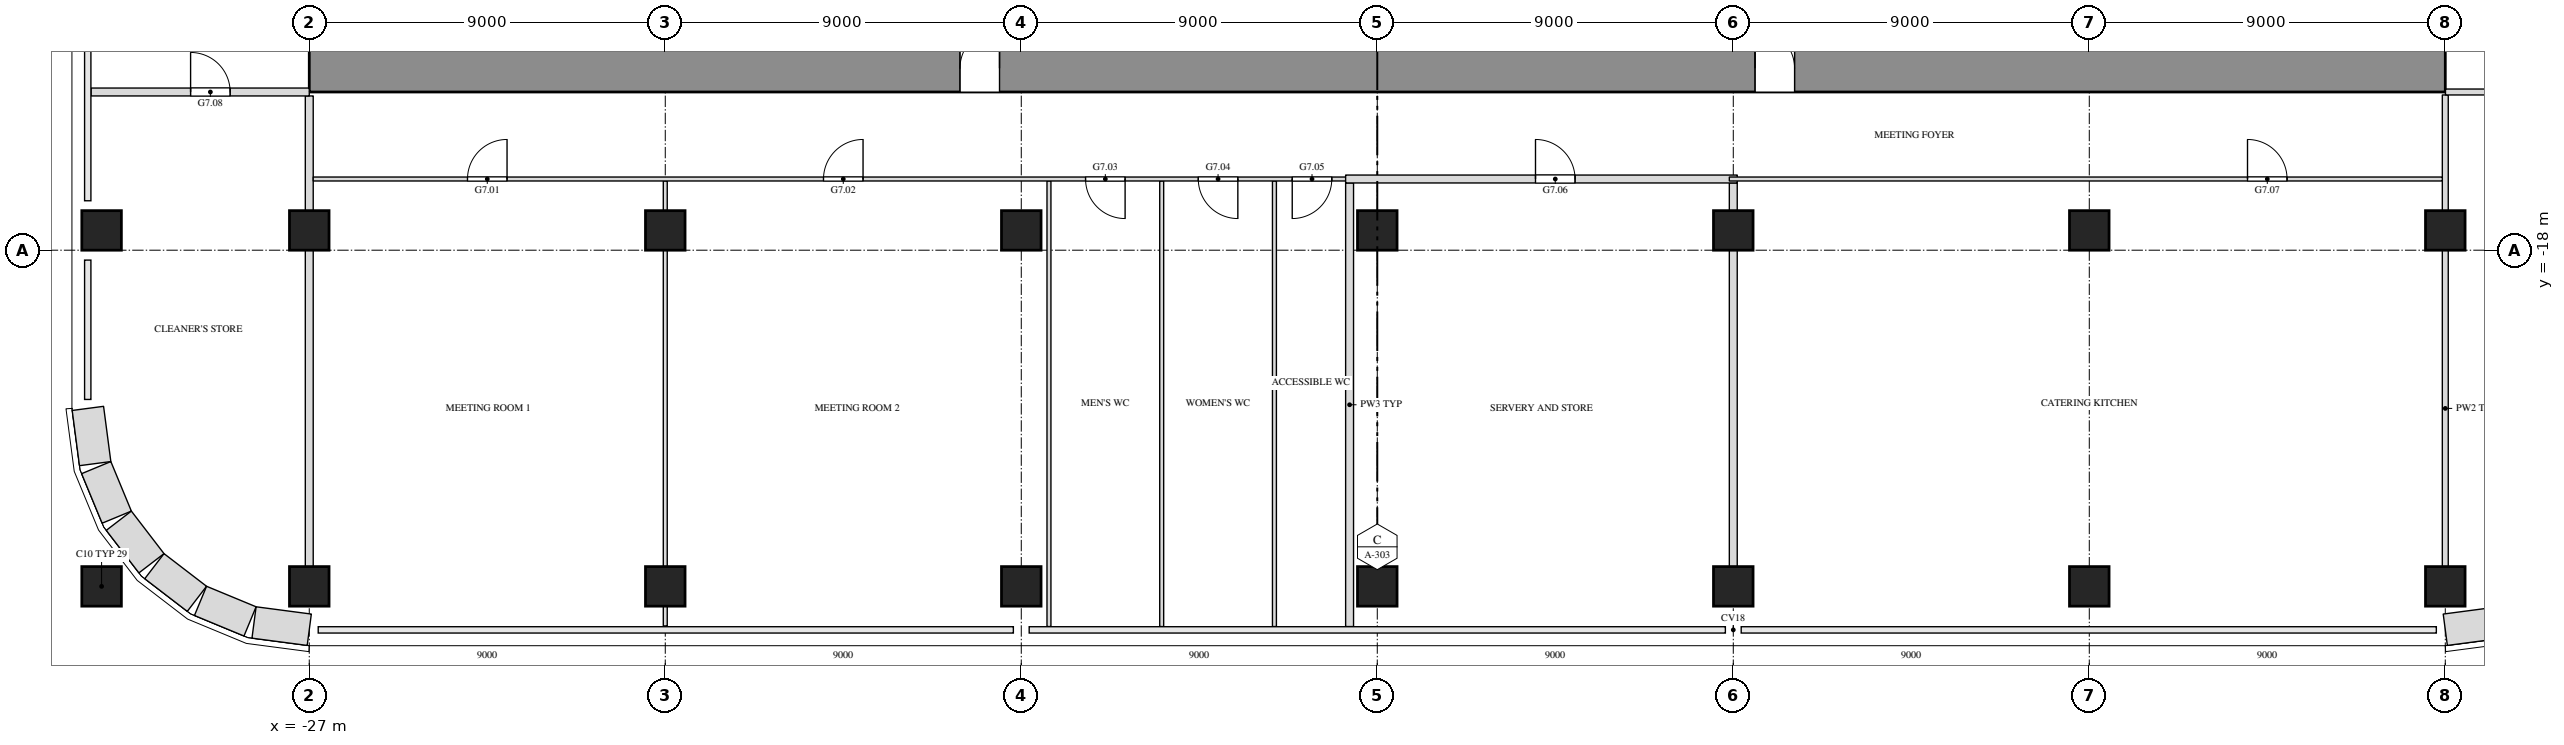
"""IFC4 building model, lengths in metres.
Left out: names, types, materials, properties, quantities, classifications, styles, units other than length and angle.
Written with IfcOpenShell. Run it as: python <this file> out.ifc"""

import sys

from ifc_helpers import new_model, si_unit, direction, frame, frame_2d, origin, origin_2d, place, context, subcontext, project, spatial, rectangle, extrude, element, fill, save


model = new_model("IFC4")
c1 = context("Model", 3, precision=1e-05, world=origin(), true_north=direction((0.0, 1.0)))
c2 = subcontext(c1, "Body", "Model", "MODEL_VIEW")
j1 = project(units=[si_unit("LENGTHUNIT", "METRE"), si_unit("PLANEANGLEUNIT", "RADIAN")], contexts=[c1])
p1 = place(None, origin())
s1 = spatial("IfcSite", under=j1, at=p1, CompositionType="ELEMENT")
p2 = place(p1, origin())
s2 = spatial("IfcBuilding", under=s1, at=p2, CompositionType="ELEMENT")
p3 = place(p2, frame((0.0, 0.0, 43.5)))
s3 = spatial("IfcBuildingStorey", under=s2, at=p3, CompositionType="ELEMENT", Elevation=43.5)
for number, where, z_axis, x_axis in (
    (1, (-32.25, -26.5, 0.0), (0.0, 0.0, 1.0), (1.0, 0.0, 0.0)),
    (2, (-27.0, -26.5, 0.0), (0.0, 0.0, 1.0), (1.0, 0.0, 0.0)),
    (3, (-18.0, -26.5, 0.0), (0.0, 0.0, 1.0), (1.0, 0.0, 0.0)),
    (4, (-9.0, -26.5, 0.0), (0.0, 0.0, 1.0), (1.0, 0.0, 0.0)),
    (5, (0.0, -26.5, 0.0), (0.0, 0.0, 1.0), (1.0, 0.0, 0.0)),
    (6, (9.0, -26.5, 0.0), (0.0, 0.0, 1.0), (1.0, 0.0, 0.0)),
    (7, (18.0, -26.5, 0.0), (0.0, 0.0, 1.0), (1.0, 0.0, 0.0)),
    (8, (27.0, -26.5, 0.0), (0.0, 0.0, 1.0), (1.0, 0.0, 0.0)),
    (9, (-32.25, -17.5, 0.0), (0.0, 0.0, 1.0), (1.0, 0.0, 0.0)),
    (10, (-27.0, -17.5, 0.0), (0.0, 0.0, 1.0), (1.0, 0.0, 0.0)),
    (11, (-18.0, -17.5, 0.0), (0.0, 0.0, 1.0), (1.0, 0.0, 0.0)),
    (12, (-9.0, -17.5, 0.0), (0.0, 0.0, 1.0), (1.0, 0.0, 0.0)),
    (13, (0.0, -17.5, 0.0), (0.0, 0.0, 1.0), (1.0, 0.0, 0.0)),
    (14, (9.0, -17.5, 0.0), (0.0, 0.0, 1.0), (1.0, 0.0, 0.0)),
    (15, (18.0, -17.5, 0.0), (0.0, 0.0, 1.0), (1.0, 0.0, 0.0)),
    (16, (27.0, -17.5, 0.0), (0.0, 0.0, 1.0), (1.0, 0.0, 0.0)),
):
    element("IfcColumn", number, at=place(p3, frame(where, z_axis=z_axis, x_axis=x_axis)), inside=s3, PredefinedType="COLUMN", context=c2, shape_type="SweptSolid", body=[
        extrude(rectangle(XDim=1.0, YDim=1.0, at=origin_2d()), origin(), (0.0, 0.0, 1.0), 4.5),
    ])
p4 = place(p3, frame((-27.0, -13.4, 0.0), z_axis=(0.0, 0.0, 1.0), x_axis=(1.0, 0.0, 0.0)))
e17 = element("IfcWall", 17, at=p4, inside=s3, PredefinedType="SHEAR", context=c2, shape_type="SweptSolid", body=[
    extrude(rectangle(XDim=54.0, YDim=1.2, at=frame_2d((27.0, 0.0))), origin(), (0.0, 0.0, 1.0), 4.25),
])
p5 = place(p4, frame((16.45, 0.0, 0.0)))
e18 = element("IfcOpeningElement", 18, at=p5, cuts=e17, PredefinedType="OPENING", context=c2, shape_type="SweptSolid", body=[
    extrude(rectangle(XDim=1.0, YDim=2.1, at=frame_2d((0.5, 1.05))), frame((0.0, 0.612, 0.0), z_axis=(0.0, -1.0, 0.0), x_axis=(1.0, 0.0, 0.0)), (0.0, 0.0, 1.0), 1.224),
])
p6 = place(p4, frame((36.55, 0.0, 0.0)))
e19 = element("IfcOpeningElement", 19, at=p6, cuts=e17, PredefinedType="OPENING", context=c2, shape_type="SweptSolid", body=[
    extrude(rectangle(XDim=1.0, YDim=2.1, at=frame_2d((0.5, 1.05))), frame((0.0, 0.612, 0.0), z_axis=(0.0, -1.0, 0.0), x_axis=(1.0, 0.0, 0.0)), (0.0, 0.0, 1.0), 1.224),
])
p7 = place(p3, frame((-18.0, -27.5, 0.0), z_axis=(0.0, 0.0, 1.0), x_axis=(0.0, 1.0, 0.0)))
e20 = element("IfcWall", 20, at=p7, inside=s3, PredefinedType="PARTITIONING", context=c2, shape_type="SweptSolid", body=[
    extrude(rectangle(XDim=0.5, YDim=0.1, at=frame_2d((0.25, 0.0))), origin(), (0.0, 0.0, 1.0), 4.25),
])
p8 = place(p3, frame((-18.0, -26.0, 0.0), z_axis=(0.0, 0.0, 1.0), x_axis=(0.0, 1.0, 0.0)))
e21 = element("IfcWall", 21, at=p8, inside=s3, PredefinedType="PARTITIONING", context=c2, shape_type="SweptSolid", body=[
    extrude(rectangle(XDim=8.0, YDim=0.1, at=frame_2d((4.0, 0.0))), origin(), (0.0, 0.0, 1.0), 3.638),
])
p9 = place(p3, frame((-18.0, -17.0, 0.0), z_axis=(0.0, 0.0, 1.0), x_axis=(0.0, 1.0, 0.0)))
e22 = element("IfcWall", 22, at=p9, inside=s3, PredefinedType="PARTITIONING", context=c2, shape_type="SweptSolid", body=[
    extrude(rectangle(XDim=0.75, YDim=0.1, at=frame_2d((0.375, 0.0))), origin(), (0.0, 0.0, 1.0), 4.25),
])
for number, where, z_axis, x_axis in (
    (23, (-8.3, -27.516, 0.0), (0.0, 0.0, 1.0), (0.0, 1.0, 0.0)),
    (24, (-5.45, -27.516, 0.0), (0.0, 0.0, 1.0), (0.0, 1.0, 0.0)),
    (25, (-2.6, -27.516, 0.0), (0.0, 0.0, 1.0), (0.0, 1.0, 0.0)),
):
    element("IfcWall", number, at=place(p3, frame(where, z_axis=z_axis, x_axis=x_axis)), inside=s3, PredefinedType="PARTITIONING", context=c2, shape_type="SweptSolid", body=[
        extrude(rectangle(XDim=11.266, YDim=0.1, at=frame_2d((5.633, 0.0))), origin(), (0.0, 0.0, 1.0), 4.25),
    ])
p10 = place(p3, frame((-0.7, -27.516, 0.0), z_axis=(0.0, 0.0, 1.0), x_axis=(0.0, 1.0, 0.0)))
e26 = element("IfcWall", 26, at=p10, inside=s3, PredefinedType="PARTITIONING", context=c2, shape_type="SweptSolid", body=[
    extrude(rectangle(XDim=11.216, YDim=0.2, at=frame_2d((5.608, 0.0))), origin(), (0.0, 0.0, 1.0), 4.25),
])
p11 = place(p3, frame((9.0, -26.0, 0.0), z_axis=(0.0, 0.0, 1.0), x_axis=(0.0, 1.0, 0.0)))
e27 = element("IfcWall", 27, at=p11, inside=s3, PredefinedType="PARTITIONING", context=c2, shape_type="SweptSolid", body=[
    extrude(rectangle(XDim=8.0, YDim=0.2, at=frame_2d((4.0, 0.0))), origin(), (0.0, 0.0, 1.0), 3.638),
])
p12 = place(p3, frame((9.0, -17.0, 0.0), z_axis=(0.0, 0.0, 1.0), x_axis=(0.0, 1.0, 0.0)))
e28 = element("IfcWall", 28, at=p12, inside=s3, PredefinedType="PARTITIONING", context=c2, shape_type="SweptSolid", body=[
    extrude(rectangle(XDim=0.7, YDim=0.2, at=frame_2d((0.35, 0.0))), origin(), (0.0, 0.0, 1.0), 4.25),
])
p13 = place(p3, frame((-27.0, -26.0, 0.0), z_axis=(0.0, 0.0, 1.0), x_axis=(0.0, 1.0, 0.0)))
e29 = element("IfcWall", 29, at=p13, inside=s3, PredefinedType="PARTITIONING", context=c2, shape_type="SweptSolid", body=[
    extrude(rectangle(XDim=8.0, YDim=0.2, at=frame_2d((4.0, 0.0))), origin(), (0.0, 0.0, 1.0), 3.638),
])
p14 = place(p3, frame((-27.0, -17.0, 0.0), z_axis=(0.0, 0.0, 1.0), x_axis=(0.0, 1.0, 0.0)))
e30 = element("IfcWall", 30, at=p14, inside=s3, PredefinedType="PARTITIONING", context=c2, shape_type="SweptSolid", body=[
    extrude(rectangle(XDim=2.9, YDim=0.2, at=frame_2d((1.45, 0.0))), origin(), (0.0, 0.0, 1.0), 3.638),
])
p15 = place(p3, frame((27.0, -26.0, 0.0), z_axis=(0.0, 0.0, 1.0), x_axis=(0.0, 1.0, 0.0)))
e31 = element("IfcWall", 31, at=p15, inside=s3, PredefinedType="PARTITIONING", context=c2, shape_type="SweptSolid", body=[
    extrude(rectangle(XDim=8.0, YDim=0.15, at=frame_2d((4.0, 0.0))), origin(), (0.0, 0.0, 1.0), 3.638),
])
p16 = place(p3, frame((27.0, -17.0, 0.0), z_axis=(0.0, 0.0, 1.0), x_axis=(0.0, 1.0, 0.0)))
e32 = element("IfcWall", 32, at=p16, inside=s3, PredefinedType="PARTITIONING", context=c2, shape_type="SweptSolid", body=[
    extrude(rectangle(XDim=2.925, YDim=0.15, at=frame_2d((1.462, 0.0))), origin(), (0.0, 0.0, 1.0), 3.638),
])
p17 = place(p3, frame((-26.9, -16.2, 0.0), z_axis=(0.0, 0.0, 1.0), x_axis=(1.0, 0.0, 0.0)))
e33 = element("IfcWall", 33, at=p17, inside=s3, PredefinedType="PARTITIONING", context=c2, shape_type="SweptSolid", body=[
    extrude(rectangle(XDim=26.3, YDim=0.1, at=frame_2d((13.15, 0.0))), origin(), (0.0, 0.0, 1.0), 4.25),
])
p18 = place(p17, frame((3.9, 0.0, 0.0)))
e34 = element("IfcOpeningElement", 34, at=p18, cuts=e33, PredefinedType="OPENING", context=c2, shape_type="SweptSolid", body=[
    extrude(rectangle(XDim=1.0, YDim=2.1, at=frame_2d((0.5, 1.05))), frame((0.0, 0.062, 0.0), z_axis=(0.0, -1.0, 0.0), x_axis=(1.0, 0.0, 0.0)), (0.0, 0.0, 1.0), 0.124),
])
p19 = place(p17, frame((12.9, 0.0, 0.0)))
e35 = element("IfcOpeningElement", 35, at=p19, cuts=e33, PredefinedType="OPENING", context=c2, shape_type="SweptSolid", body=[
    extrude(rectangle(XDim=1.0, YDim=2.1, at=frame_2d((0.5, 1.05))), frame((0.0, 0.062, 0.0), z_axis=(0.0, -1.0, 0.0), x_axis=(1.0, 0.0, 0.0)), (0.0, 0.0, 1.0), 0.124),
])
p20 = place(p17, frame((19.525, 0.0, 0.0)))
e36 = element("IfcOpeningElement", 36, at=p20, cuts=e33, PredefinedType="OPENING", context=c2, shape_type="SweptSolid", body=[
    extrude(rectangle(XDim=1.0, YDim=2.1, at=frame_2d((0.5, 1.05))), frame((0.0, 0.062, 0.0), z_axis=(0.0, -1.0, 0.0), x_axis=(1.0, 0.0, 0.0)), (0.0, 0.0, 1.0), 0.124),
])
p21 = place(p17, frame((22.375, 0.0, 0.0)))
e37 = element("IfcOpeningElement", 37, at=p21, cuts=e33, PredefinedType="OPENING", context=c2, shape_type="SweptSolid", body=[
    extrude(rectangle(XDim=1.0, YDim=2.1, at=frame_2d((0.5, 1.05))), frame((0.0, 0.062, 0.0), z_axis=(0.0, -1.0, 0.0), x_axis=(1.0, 0.0, 0.0)), (0.0, 0.0, 1.0), 0.124),
])
p22 = place(p17, frame((24.75, 0.0, 0.0)))
e38 = element("IfcOpeningElement", 38, at=p22, cuts=e33, PredefinedType="OPENING", context=c2, shape_type="SweptSolid", body=[
    extrude(rectangle(XDim=1.0, YDim=2.1, at=frame_2d((0.5, 1.05))), frame((0.0, 0.062, 0.0), z_axis=(0.0, -1.0, 0.0), x_axis=(1.0, 0.0, 0.0)), (0.0, 0.0, 1.0), 0.124),
])
p23 = place(p3, frame((-0.8, -16.2, 0.0), z_axis=(0.0, 0.0, 1.0), x_axis=(1.0, 0.0, 0.0)))
e39 = element("IfcWall", 39, at=p23, inside=s3, PredefinedType="PARTITIONING", context=c2, shape_type="SweptSolid", body=[
    extrude(rectangle(XDim=9.9, YDim=0.2, at=frame_2d((4.95, 0.0))), origin(), (0.0, 0.0, 1.0), 4.25),
])
p24 = place(p23, frame((4.8, 0.0, 0.0)))
e40 = element("IfcOpeningElement", 40, at=p24, cuts=e39, PredefinedType="OPENING", context=c2, shape_type="SweptSolid", body=[
    extrude(rectangle(XDim=1.0, YDim=2.1, at=frame_2d((0.5, 1.05))), frame((0.0, 0.112, 0.0), z_axis=(0.0, -1.0, 0.0), x_axis=(1.0, 0.0, 0.0)), (0.0, 0.0, 1.0), 0.224),
])
p25 = place(p3, frame((8.9, -16.2, 0.0), z_axis=(0.0, 0.0, 1.0), x_axis=(1.0, 0.0, 0.0)))
e41 = element("IfcWall", 41, at=p25, inside=s3, PredefinedType="PARTITIONING", context=c2, shape_type="SweptSolid", body=[
    extrude(rectangle(XDim=18.025, YDim=0.1, at=frame_2d((9.013, 0.0))), origin(), (0.0, 0.0, 1.0), 4.25),
])
p26 = place(p25, frame((13.1, 0.0, 0.0)))
e42 = element("IfcOpeningElement", 42, at=p26, cuts=e41, PredefinedType="OPENING", context=c2, shape_type="SweptSolid", body=[
    extrude(rectangle(XDim=1.0, YDim=2.1, at=frame_2d((0.5, 1.05))), frame((0.0, 0.062, 0.0), z_axis=(0.0, -1.0, 0.0), x_axis=(1.0, 0.0, 0.0)), (0.0, 0.0, 1.0), 0.124),
])
p27 = place(p3, frame((-32.516, -14.0, 0.0), z_axis=(0.0, 0.0, 1.0), x_axis=(1.0, 0.0, 0.0)))
e43 = element("IfcWall", 43, at=p27, inside=s3, PredefinedType="PARTITIONING", context=c2, shape_type="SweptSolid", body=[
    extrude(rectangle(XDim=5.516, YDim=0.2, at=frame_2d((2.758, 0.0))), origin(), (0.0, 0.0, 1.0), 4.25),
])
p28 = place(p27, frame((2.516, 0.0, 0.0)))
e44 = element("IfcOpeningElement", 44, at=p28, cuts=e43, PredefinedType="OPENING", context=c2, shape_type="SweptSolid", body=[
    extrude(rectangle(XDim=1.0, YDim=2.1, at=frame_2d((0.5, 1.05))), frame((0.0, 0.112, 0.0), z_axis=(0.0, -1.0, 0.0), x_axis=(1.0, 0.0, 0.0)), (0.0, 0.0, 1.0), 0.224),
])
p29 = place(p3, frame((27.005, -14.0, 0.0), z_axis=(0.0, 0.0, 1.0), x_axis=(1.0, 0.0, 0.0)))
e45 = element("IfcWall", 45, at=p29, inside=s3, PredefinedType="PARTITIONING", context=c2, shape_type="SweptSolid", body=[
    extrude(rectangle(XDim=5.511, YDim=0.15, at=frame_2d((2.756, 0.0))), origin(), (0.0, 0.0, 1.0), 4.25),
])
p30 = place(p29, frame((1.995, 0.0, 0.0)))
e46 = element("IfcOpeningElement", 46, at=p30, cuts=e45, PredefinedType="OPENING", context=c2, shape_type="SweptSolid", body=[
    extrude(rectangle(XDim=1.0, YDim=2.1, at=frame_2d((0.5, 1.05))), frame((0.0, 0.087, 0.0), z_axis=(0.0, -1.0, 0.0), x_axis=(1.0, 0.0, 0.0)), (0.0, 0.0, 1.0), 0.174),
])
for number, where, z_axis, x_axis in (
    (47, (27.0, -27.597, 0.0), (0.0, 0.0, 1.0), (0.991, 0.131, 0.0)),
    (48, (-32.597, -22.0, 0.0), (0.0, 0.0, 1.0), (0.131, -0.991, 0.0)),
):
    element("IfcWall", number, at=place(p3, frame(where, z_axis=z_axis, x_axis=x_axis)), inside=s3, PredefinedType="SOLIDWALL", context=c2, shape_type="SweptSolid", body=[
        extrude(rectangle(XDim=1.408, YDim=0.8, at=frame_2d((0.704, 0.0))), origin(), (0.0, 0.0, 1.0), 4.25),
    ])
p31 = place(p3, frame((-32.386, -23.497, 0.0), z_axis=(0.0, 0.0, 1.0), x_axis=(0.38276009378, -0.923847774587, 0.0)))
e49 = element("IfcWall", 49, at=p31, inside=s3, PredefinedType="SOLIDWALL", context=c2, shape_type="SweptSolid", body=[
    extrude(rectangle(XDim=1.355, YDim=0.8, at=frame_2d((0.678, 0.0))), origin(), (0.0, 0.0, 1.0), 4.25),
])
for number, where, z_axis, x_axis in (
    (50, (-31.815, -24.84, 0.0), (0.0, 0.0, 1.0), (0.609, -0.793, 0.0)),
    (51, (-30.916, -25.989, 0.0), (0.0, 0.0, 1.0), (0.793, -0.609, 0.0)),
):
    element("IfcWall", number, at=place(p3, frame(where, z_axis=z_axis, x_axis=x_axis)), inside=s3, PredefinedType="SOLIDWALL", context=c2, shape_type="SweptSolid", body=[
        extrude(rectangle(XDim=1.356, YDim=0.8, at=frame_2d((0.678, 0.0))), origin(), (0.0, 0.0, 1.0), 4.25),
    ])
p32 = place(p3, frame((-29.75, -26.867, 0.0), z_axis=(0.0, 0.0, 1.0), x_axis=(0.923847774587, -0.38276009378, 0.0)))
e52 = element("IfcWall", 52, at=p32, inside=s3, PredefinedType="SOLIDWALL", context=c2, shape_type="SweptSolid", body=[
    extrude(rectangle(XDim=1.355, YDim=0.8, at=frame_2d((0.678, 0.0))), origin(), (0.0, 0.0, 1.0), 4.25),
])
p33 = place(p3, frame((-28.396, -27.413, 0.0), z_axis=(0.0, 0.0, 1.0), x_axis=(0.99144603414, -0.130517283865, 0.0)))
e53 = element("IfcWall", 53, at=p33, inside=s3, PredefinedType="SOLIDWALL", context=c2, shape_type="SweptSolid", body=[
    extrude(rectangle(XDim=1.408, YDim=0.8, at=frame_2d((0.704, 0.0))), origin(), (0.0, 0.0, 1.0), 4.25),
])
p34 = place(p18, origin())
e54 = element("IfcDoor", 54, at=p34, inside=s3, OperationType="SINGLE_SWING_RIGHT", PredefinedType="DOOR", context=c2, shape_type="SweptSolid", body=[
    extrude(rectangle(XDim=1.0, YDim=2.1, at=frame_2d((0.5, 1.05))), frame((0.0, 0.025, 0.0), z_axis=(0.0, -1.0, 0.0), x_axis=(1.0, 0.0, 0.0)), (0.0, 0.0, 1.0), 0.05),
])
fill(e34, e54)
p35 = place(p19, origin())
e55 = element("IfcDoor", 55, at=p35, inside=s3, OperationType="SINGLE_SWING_RIGHT", PredefinedType="DOOR", context=c2, shape_type="SweptSolid", body=[
    extrude(rectangle(XDim=1.0, YDim=2.1, at=frame_2d((0.5, 1.05))), frame((0.0, 0.025, 0.0), z_axis=(0.0, -1.0, 0.0), x_axis=(1.0, 0.0, 0.0)), (0.0, 0.0, 1.0), 0.05),
])
fill(e35, e55)
p36 = place(p20, origin())
e56 = element("IfcDoor", 56, at=p36, inside=s3, OperationType="SINGLE_SWING_LEFT", PredefinedType="DOOR", context=c2, shape_type="SweptSolid", body=[
    extrude(rectangle(XDim=1.0, YDim=2.1, at=frame_2d((0.5, 1.05))), frame((0.0, 0.025, 0.0), z_axis=(0.0, -1.0, 0.0), x_axis=(1.0, 0.0, 0.0)), (0.0, 0.0, 1.0), 0.05),
])
fill(e36, e56)
p37 = place(p21, origin())
e57 = element("IfcDoor", 57, at=p37, inside=s3, OperationType="SINGLE_SWING_LEFT", PredefinedType="DOOR", context=c2, shape_type="SweptSolid", body=[
    extrude(rectangle(XDim=1.0, YDim=2.1, at=frame_2d((0.5, 1.05))), frame((0.0, 0.025, 0.0), z_axis=(0.0, -1.0, 0.0), x_axis=(1.0, 0.0, 0.0)), (0.0, 0.0, 1.0), 0.05),
])
fill(e37, e57)
p38 = place(p22, origin())
e58 = element("IfcDoor", 58, at=p38, inside=s3, OperationType="SINGLE_SWING_RIGHT", PredefinedType="DOOR", context=c2, shape_type="SweptSolid", body=[
    extrude(rectangle(XDim=1.0, YDim=2.1, at=frame_2d((0.5, 1.05))), frame((0.0, 0.025, 0.0), z_axis=(0.0, -1.0, 0.0), x_axis=(1.0, 0.0, 0.0)), (0.0, 0.0, 1.0), 0.05),
])
fill(e38, e58)
p39 = place(p24, origin())
e59 = element("IfcDoor", 59, at=p39, inside=s3, OperationType="SINGLE_SWING_LEFT", PredefinedType="DOOR", context=c2, shape_type="SweptSolid", body=[
    extrude(rectangle(XDim=1.0, YDim=2.1, at=frame_2d((0.5, 1.05))), frame((0.0, 0.025, 0.0), z_axis=(0.0, -1.0, 0.0), x_axis=(1.0, 0.0, 0.0)), (0.0, 0.0, 1.0), 0.05),
])
fill(e40, e59)
p40 = place(p26, origin())
e60 = element("IfcDoor", 60, at=p40, inside=s3, OperationType="SINGLE_SWING_LEFT", PredefinedType="DOOR", context=c2, shape_type="SweptSolid", body=[
    extrude(rectangle(XDim=1.0, YDim=2.1, at=frame_2d((0.5, 1.05))), frame((0.0, 0.025, 0.0), z_axis=(0.0, -1.0, 0.0), x_axis=(1.0, 0.0, 0.0)), (0.0, 0.0, 1.0), 0.05),
])
fill(e42, e60)
p41 = place(p28, origin())
e61 = element("IfcDoor", 61, at=p41, inside=s3, OperationType="SINGLE_SWING_LEFT", PredefinedType="DOOR", context=c2, shape_type="SweptSolid", body=[
    extrude(rectangle(XDim=1.0, YDim=2.1, at=frame_2d((0.5, 1.05))), frame((0.0, 0.025, 0.0), z_axis=(0.0, -1.0, 0.0), x_axis=(1.0, 0.0, 0.0)), (0.0, 0.0, 1.0), 0.05),
])
fill(e44, e61)
p42 = place(p5, origin())
e62 = element("IfcDoor", 62, at=p42, inside=s3, OperationType="SINGLE_SWING_RIGHT", PredefinedType="DOOR", context=c2, shape_type="SweptSolid", body=[
    extrude(rectangle(XDim=1.0, YDim=2.1, at=frame_2d((0.5, 1.05))), frame((0.0, 0.025, 0.0), z_axis=(0.0, -1.0, 0.0), x_axis=(1.0, 0.0, 0.0)), (0.0, 0.0, 1.0), 0.05),
])
fill(e18, e62)
p43 = place(p6, origin())
e63 = element("IfcDoor", 63, at=p43, inside=s3, OperationType="SINGLE_SWING_LEFT", PredefinedType="DOOR", context=c2, shape_type="SweptSolid", body=[
    extrude(rectangle(XDim=1.0, YDim=2.1, at=frame_2d((0.5, 1.05))), frame((0.0, 0.025, 0.0), z_axis=(0.0, -1.0, 0.0), x_axis=(1.0, 0.0, 0.0)), (0.0, 0.0, 1.0), 0.05),
])
fill(e19, e63)
save(model, sys.argv[1])
